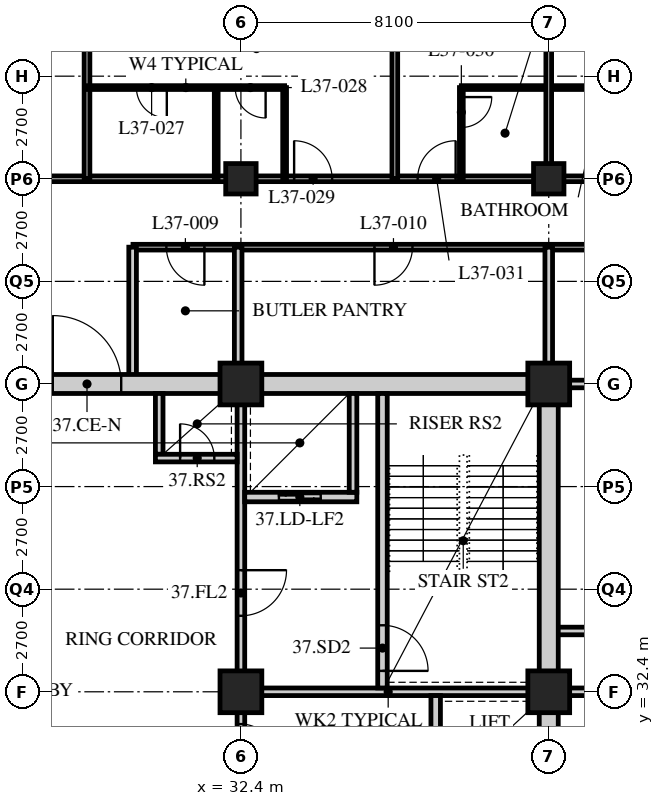
"""IFC4 building model, lengths in metres.
Left out: names, types, materials, properties, quantities, classifications, styles, units other than length and angle.
Written with IfcOpenShell. Run it as: python <this file> out.ifc"""

import sys

from ifc_helpers import new_model, si_unit, direction, frame, frame_2d, origin, origin_2d, place, context, subcontext, project, spatial, rectangle, hollow_rectangle, extrude, element, fill, save


model = new_model("IFC4")
c1 = context("Model", 3, precision=1e-05, world=origin(), true_north=direction((0.0, 1.0)))
c2 = subcontext(c1, "Body", "Model", "MODEL_VIEW")
j1 = project(units=[si_unit("LENGTHUNIT", "METRE"), si_unit("PLANEANGLEUNIT", "RADIAN")], contexts=[c1])
p1 = place(None, origin())
s1 = spatial("IfcSite", under=j1, at=p1, CompositionType="ELEMENT")
p2 = place(p1, origin())
s2 = spatial("IfcBuilding", under=s1, at=p2, CompositionType="ELEMENT")
p3 = place(p2, frame((0.0, 0.0, 144.2)))
s3 = spatial("IfcBuildingStorey", under=s2, at=p3, CompositionType="ELEMENT", Elevation=144.2)
for number, where, z_axis, x_axis in (
    (1, (32.4, 32.4, 0.0), (0.0, 0.0, 1.0), (1.0, 0.0, 0.0)),
    (2, (32.4, 40.5, 0.0), (0.0, 0.0, 1.0), (1.0, 0.0, 0.0)),
):
    element("IfcColumn", number, at=place(p3, frame(where, z_axis=z_axis, x_axis=x_axis)), inside=s3, PredefinedType="COLUMN", context=c2, shape_type="SweptSolid", body=[
        extrude(hollow_rectangle(XDim=1.1, YDim=1.1, WallThickness=0.1, at=origin_2d()), origin(), (0.0, 0.0, 1.0), 3.4),
    ])
p4 = place(p3, frame((32.4, 45.9, 0.0), z_axis=(0.0, 0.0, 1.0), x_axis=(1.0, 0.0, 0.0)))
e3 = element("IfcColumn", 3, at=p4, inside=s3, PredefinedType="COLUMN", context=c2, shape_type="SweptSolid", body=[
    extrude(hollow_rectangle(XDim=0.8, YDim=0.8, WallThickness=0.08, at=origin_2d()), origin(), (0.0, 0.0, 1.0), 3.4),
])
for number, where, z_axis, x_axis in (
    (4, (40.5, 32.4, 0.0), (0.0, 0.0, 1.0), (1.0, 0.0, 0.0)),
    (5, (40.5, 40.5, 0.0), (0.0, 0.0, 1.0), (1.0, 0.0, 0.0)),
):
    element("IfcColumn", number, at=place(p3, frame(where, z_axis=z_axis, x_axis=x_axis)), inside=s3, PredefinedType="COLUMN", context=c2, shape_type="SweptSolid", body=[
        extrude(hollow_rectangle(XDim=1.1, YDim=1.1, WallThickness=0.1, at=origin_2d()), origin(), (0.0, 0.0, 1.0), 3.4),
    ])
p5 = place(p3, frame((40.5, 45.9, 0.0), z_axis=(0.0, 0.0, 1.0), x_axis=(1.0, 0.0, 0.0)))
e6 = element("IfcColumn", 6, at=p5, inside=s3, PredefinedType="COLUMN", context=c2, shape_type="SweptSolid", body=[
    extrude(hollow_rectangle(XDim=0.8, YDim=0.8, WallThickness=0.08, at=origin_2d()), origin(), (0.0, 0.0, 1.0), 3.4),
])
p6 = place(p3, frame((12.15, 45.9, 0.0), z_axis=(0.0, 0.0, 1.0), x_axis=(1.0, 0.0, 0.0)))
e7 = element("IfcWall", 7, at=p6, inside=s3, PredefinedType="PARTITIONING", context=c2, shape_type="SweptSolid", body=[
    extrude(rectangle(XDim=36.45, YDim=0.15, at=frame_2d((18.225, 0.0))), origin(), (0.0, 0.0, 1.0), 2.42),
])
p7 = place(p6, frame((9.225, 0.0, 0.0)))
e8 = element("IfcOpeningElement", 8, at=p7, cuts=e7, PredefinedType="OPENING", context=c2, shape_type="SweptSolid", body=[
    extrude(rectangle(XDim=1.8, YDim=2.4, at=frame_2d((0.9, 1.2))), frame((0.0, 0.085, 0.0), z_axis=(0.0, -1.0, 0.0), x_axis=(1.0, 0.0, 0.0)), (0.0, 0.0, 1.0), 0.17),
])
p8 = place(p6, frame((21.65, 0.0, 0.0)))
e9 = element("IfcOpeningElement", 9, at=p8, cuts=e7, PredefinedType="OPENING", context=c2, shape_type="SweptSolid", body=[
    extrude(rectangle(XDim=1.0, YDim=2.1, at=frame_2d((0.5, 1.05))), frame((0.0, 0.085, 0.0), z_axis=(0.0, -1.0, 0.0), x_axis=(1.0, 0.0, 0.0)), (0.0, 0.0, 1.0), 0.17),
])
p9 = place(p6, frame((24.9, 0.0, 0.0)))
e10 = element("IfcOpeningElement", 10, at=p9, cuts=e7, PredefinedType="OPENING", context=c2, shape_type="SweptSolid", body=[
    extrude(rectangle(XDim=1.0, YDim=2.1, at=frame_2d((0.5, 1.05))), frame((0.0, 0.085, 0.0), z_axis=(0.0, -1.0, 0.0), x_axis=(1.0, 0.0, 0.0)), (0.0, 0.0, 1.0), 0.17),
])
p10 = place(p6, frame((30.8, 0.0, 0.0)))
e11 = element("IfcOpeningElement", 11, at=p10, cuts=e7, PredefinedType="OPENING", context=c2, shape_type="SweptSolid", body=[
    extrude(rectangle(XDim=1.0, YDim=2.1, at=frame_2d((0.5, 1.05))), frame((0.0, 0.085, 0.0), z_axis=(0.0, -1.0, 0.0), x_axis=(1.0, 0.0, 0.0)), (0.0, 0.0, 1.0), 0.17),
])
p11 = place(p6, frame((32.825, 0.0, 0.0)))
e12 = element("IfcOpeningElement", 12, at=p11, cuts=e7, PredefinedType="OPENING", context=c2, shape_type="SweptSolid", body=[
    extrude(rectangle(XDim=1.0, YDim=2.1, at=frame_2d((0.5, 1.05))), frame((0.0, 0.085, 0.0), z_axis=(0.0, -1.0, 0.0), x_axis=(1.0, 0.0, 0.0)), (0.0, 0.0, 1.0), 0.17),
])
p12 = place(p6, frame((1.525, 0.0, 0.0)))
e13 = element("IfcOpeningElement", 13, at=p12, cuts=e7, PredefinedType="OPENING", context=c2, shape_type="SweptSolid", body=[
    extrude(rectangle(XDim=1.0, YDim=2.1, at=frame_2d((0.5, 1.05))), frame((0.0, 0.085, 0.0), z_axis=(0.0, -1.0, 0.0), x_axis=(1.0, 0.0, 0.0)), (0.0, 0.0, 1.0), 0.17),
])
p13 = place(p3, frame((46.8, 44.1, 0.0), z_axis=(0.0, 0.0, 1.0), x_axis=(-1.0, 0.0, 0.0)))
e14 = element("IfcWall", 14, at=p13, inside=s3, PredefinedType="PARTITIONING", context=c2, shape_type="SweptSolid", body=[
    extrude(rectangle(XDim=17.24, YDim=0.15, at=frame_2d((8.62, 0.0))), origin(), (0.0, 0.0, 1.0), 3.19),
])
p14 = place(p13, frame((15.361, 0.0, 0.0)))
e15 = element("IfcOpeningElement", 15, at=p14, cuts=e14, PredefinedType="OPENING", context=c2, shape_type="SweptSolid", body=[
    extrude(rectangle(XDim=1.0, YDim=2.1, at=frame_2d((0.5, 1.05))), frame((0.0, 0.085, 0.0), z_axis=(0.0, -1.0, 0.0), x_axis=(1.0, 0.0, 0.0)), (0.0, 0.0, 1.0), 0.17),
])
p15 = place(p13, frame((9.886, 0.0, 0.0)))
e16 = element("IfcOpeningElement", 16, at=p15, cuts=e14, PredefinedType="OPENING", context=c2, shape_type="SweptSolid", body=[
    extrude(rectangle(XDim=1.0, YDim=2.1, at=frame_2d((0.5, 1.05))), frame((0.0, 0.085, 0.0), z_axis=(0.0, -1.0, 0.0), x_axis=(1.0, 0.0, 0.0)), (0.0, 0.0, 1.0), 0.17),
])
p16 = place(p13, frame((2.65, 0.0, 0.0)))
e17 = element("IfcOpeningElement", 17, at=p16, cuts=e14, PredefinedType="OPENING", context=c2, shape_type="SweptSolid", body=[
    extrude(rectangle(XDim=1.0, YDim=2.1, at=frame_2d((0.5, 1.05))), frame((0.0, 0.085, 0.0), z_axis=(0.0, -1.0, 0.0), x_axis=(1.0, 0.0, 0.0)), (0.0, 0.0, 1.0), 0.17),
])
for number, where, z_axis, x_axis in (
    (18, (40.5, 32.4, 0.0), (0.0, 0.0, 1.0), (1.0, 0.0, 0.0)),
    (19, (46.8, 34.0, 0.0), (0.0, 0.0, 1.0), (-1.0, 0.0, 0.0)),
):
    element("IfcWall", number, at=place(p3, frame(where, z_axis=z_axis, x_axis=x_axis)), inside=s3, PredefinedType="SOLIDWALL", context=c2, shape_type="SweptSolid", body=[
        extrude(rectangle(XDim=6.3, YDim=0.2, at=frame_2d((3.15, 0.0))), origin(), (0.0, 0.0, 1.0), 3.19),
    ])
for number, where, z_axis, x_axis in (
    (20, (40.5, 40.5, 0.0), (0.0, 0.0, 1.0), (0.0, 1.0, 0.0)),
    (21, (32.328, 44.1, 0.0), (0.0, 0.0, 1.0), (0.0, -1.0, 0.0)),
):
    element("IfcWall", number, at=place(p3, frame(where, z_axis=z_axis, x_axis=x_axis)), inside=s3, PredefinedType="SOLIDWALL", context=c2, shape_type="SweptSolid", body=[
        extrude(rectangle(XDim=3.6, YDim=0.2, at=frame_2d((1.8, 0.0))), origin(), (0.0, 0.0, 1.0), 2.42),
    ])
p17 = place(p3, frame((29.55, 40.5, 0.0), z_axis=(0.0, 0.0, 1.0), x_axis=(0.0, 1.0, 0.0)))
e22 = element("IfcWall", 22, at=p17, inside=s3, PredefinedType="SOLIDWALL", context=c2, shape_type="SweptSolid", body=[
    extrude(rectangle(XDim=3.6, YDim=0.2, at=frame_2d((1.8, 0.0))), origin(), (0.0, 0.0, 1.0), 3.19),
])
p18 = place(p3, frame((40.5, 40.5, 0.0), z_axis=(0.0, 0.0, 1.0), x_axis=(1.0, 0.0, 0.0)))
e23 = element("IfcWall", 23, at=p18, inside=s3, PredefinedType="SOLIDWALL", context=c2, shape_type="SweptSolid", body=[
    extrude(rectangle(XDim=6.3, YDim=0.2, at=frame_2d((3.15, 0.0))), origin(), (0.0, 0.0, 1.0), 3.19),
])
p19 = place(p3, frame((28.35, 45.9, 0.0), z_axis=(0.0, 0.0, 1.0), x_axis=(0.0, 1.0, 0.0)))
e24 = element("IfcWall", 24, at=p19, inside=s3, PredefinedType="PARTITIONING", context=c2, shape_type="SweptSolid", body=[
    extrude(rectangle(XDim=7.8, YDim=0.15, at=frame_2d((3.9, 0.0))), origin(), (0.0, 0.0, 1.0), 3.19),
])
p20 = place(p3, frame((28.35, 48.3, 0.0), z_axis=(0.0, 0.0, 1.0), x_axis=(1.0, 0.0, 0.0)))
e25 = element("IfcWall", 25, at=p20, inside=s3, PredefinedType="PARTITIONING", context=c2, shape_type="SweptSolid", body=[
    extrude(rectangle(XDim=5.2, YDim=0.1, at=frame_2d((2.6, 0.0))), origin(), (0.0, 0.0, 1.0), 3.19),
])
p21 = place(p20, frame((1.3, 0.0, 0.0)))
e26 = element("IfcOpeningElement", 26, at=p21, cuts=e25, PredefinedType="OPENING", context=c2, shape_type="SweptSolid", body=[
    extrude(rectangle(XDim=0.8, YDim=2.1, at=frame_2d((0.4, 1.05))), frame((0.0, 0.06, 0.0), z_axis=(0.0, -1.0, 0.0), x_axis=(1.0, 0.0, 0.0)), (0.0, 0.0, 1.0), 0.12),
])
p22 = place(p20, frame((3.9, 0.0, 0.0)))
e27 = element("IfcOpeningElement", 27, at=p22, cuts=e25, PredefinedType="OPENING", context=c2, shape_type="SweptSolid", body=[
    extrude(rectangle(XDim=0.8, YDim=2.1, at=frame_2d((0.4, 1.05))), frame((0.0, 0.06, 0.0), z_axis=(0.0, -1.0, 0.0), x_axis=(1.0, 0.0, 0.0)), (0.0, 0.0, 1.0), 0.12),
])
for number, where, z_axis, x_axis in (
    (28, (31.75, 45.9, 0.0), (0.0, 0.0, 1.0), (0.0, 1.0, 0.0)),
    (29, (33.55, 45.9, 0.0), (0.0, 0.0, 1.0), (0.0, 1.0, 0.0)),
):
    element("IfcWall", number, at=place(p3, frame(where, z_axis=z_axis, x_axis=x_axis)), inside=s3, PredefinedType="PARTITIONING", context=c2, shape_type="SweptSolid", body=[
        extrude(rectangle(XDim=2.4, YDim=0.1, at=frame_2d((1.2, 0.0))), origin(), (0.0, 0.0, 1.0), 3.19),
    ])
p23 = place(p3, frame((36.45, 45.9, 0.0), z_axis=(0.0, 0.0, 1.0), x_axis=(0.0, 1.0, 0.0)))
e30 = element("IfcWall", 30, at=p23, inside=s3, PredefinedType="PARTITIONING", context=c2, shape_type="SweptSolid", body=[
    extrude(rectangle(XDim=7.8, YDim=0.15, at=frame_2d((3.9, 0.0))), origin(), (0.0, 0.0, 1.0), 3.19),
])
p24 = place(p3, frame((38.2, 48.3, 0.0), z_axis=(0.0, 0.0, 1.0), x_axis=(1.0, 0.0, 0.0)))
e31 = element("IfcWall", 31, at=p24, inside=s3, PredefinedType="PARTITIONING", context=c2, shape_type="SweptSolid", body=[
    extrude(rectangle(XDim=4.6, YDim=0.1, at=frame_2d((2.3, 0.0))), origin(), (0.0, 0.0, 1.0), 3.19),
])
p25 = place(p3, frame((38.2, 45.9, 0.0), z_axis=(0.0, 0.0, 1.0), x_axis=(0.0, 1.0, 0.0)))
e32 = element("IfcWall", 32, at=p25, inside=s3, PredefinedType="PARTITIONING", context=c2, shape_type="SweptSolid", body=[
    extrude(rectangle(XDim=2.4, YDim=0.1, at=frame_2d((1.2, 0.0))), origin(), (0.0, 0.0, 1.0), 3.19),
])
p26 = place(p25, frame((1.35, 0.0, 0.0)))
e33 = element("IfcOpeningElement", 33, at=p26, cuts=e32, PredefinedType="OPENING", context=c2, shape_type="SweptSolid", body=[
    extrude(rectangle(XDim=0.8, YDim=2.1, at=frame_2d((0.4, 1.05))), frame((0.0, 0.06, 0.0), z_axis=(0.0, -1.0, 0.0), x_axis=(1.0, 0.0, 0.0)), (0.0, 0.0, 1.0), 0.12),
])
p27 = place(p3, frame((40.5, 45.9, 0.0), z_axis=(0.0, 0.0, 1.0), x_axis=(0.0, 1.0, 0.0)))
e34 = element("IfcWall", 34, at=p27, inside=s3, PredefinedType="PARTITIONING", context=c2, shape_type="SweptSolid", body=[
    extrude(rectangle(XDim=7.8, YDim=0.15, at=frame_2d((3.9, 0.0))), origin(), (0.0, 0.0, 1.0), 2.42),
])
p28 = place(p3, frame((15.95, 40.5, 0.0), z_axis=(0.0, 0.0, 1.0), x_axis=(1.0, 0.0, 0.0)))
e35 = element("IfcWall", 35, at=p28, inside=s3, PredefinedType="SOLIDWALL", context=c2, shape_type="SweptSolid", body=[
    extrude(rectangle(XDim=24.8, YDim=0.5, at=frame_2d((12.4, 0.0))), origin(), (0.0, 0.0, 1.0), 2.42),
])
p29 = place(p28, frame((11.5, 0.0, 0.0)))
e36 = element("IfcOpeningElement", 36, at=p29, cuts=e35, PredefinedType="OPENING", context=c2, shape_type="SweptSolid", body=[
    extrude(rectangle(XDim=1.8, YDim=2.4, at=frame_2d((0.9, 1.2))), frame((0.0, 0.26, 0.0), z_axis=(0.0, -1.0, 0.0), x_axis=(1.0, 0.0, 0.0)), (0.0, 0.0, 1.0), 0.52),
])
p30 = place(p3, frame((40.5, 24.55, 0.0), z_axis=(0.0, 0.0, 1.0), x_axis=(0.0, 1.0, 0.0)))
e37 = element("IfcWall", 37, at=p30, inside=s3, PredefinedType="SOLIDWALL", context=c2, shape_type="SweptSolid", body=[
    extrude(rectangle(XDim=15.7, YDim=0.5, at=frame_2d((7.85, 0.0))), origin(), (0.0, 0.0, 1.0), 2.42),
])
p31 = place(p3, frame((32.3, 32.4, 0.0), z_axis=(0.0, 0.0, 1.0), x_axis=(1.0, 0.0, 0.0)))
e38 = element("IfcWall", 38, at=p31, inside=s3, PredefinedType="SOLIDWALL", context=c2, shape_type="SweptSolid", body=[
    extrude(rectangle(XDim=7.95, YDim=0.2, at=frame_2d((3.975, 0.0))), origin(), (0.0, 0.0, 1.0), 2.578),
])
p32 = place(p3, frame((32.4, 32.5, 0.0), z_axis=(0.0, 0.0, 1.0), x_axis=(0.0, 1.0, 0.0)))
e39 = element("IfcWall", 39, at=p32, inside=s3, PredefinedType="SOLIDWALL", context=c2, shape_type="SweptSolid", body=[
    extrude(rectangle(XDim=7.75, YDim=0.2, at=frame_2d((3.875, 0.0))), origin(), (0.0, 0.0, 1.0), 2.578),
])
p33 = place(p32, frame((1.9, 0.0, 0.0)))
e40 = element("IfcOpeningElement", 40, at=p33, cuts=e39, PredefinedType="OPENING", context=c2, shape_type="SweptSolid", body=[
    extrude(rectangle(XDim=1.2, YDim=2.1, at=frame_2d((0.6, 1.05))), frame((0.0, 0.11, 0.0), z_axis=(0.0, -1.0, 0.0), x_axis=(1.0, 0.0, 0.0)), (0.0, 0.0, 1.0), 0.22),
])
p34 = place(p3, frame((37.525, 24.55, 0.0), z_axis=(0.0, 0.0, 1.0), x_axis=(0.0, 1.0, 0.0)))
e41 = element("IfcWall", 41, at=p34, inside=s3, PredefinedType="SOLIDWALL", context=c2, shape_type="SweptSolid", body=[
    extrude(rectangle(XDim=7.75, YDim=0.25, at=frame_2d((3.875, 0.0))), origin(), (0.0, 0.0, 1.0), 3.19),
])
p35 = place(p3, frame((36.125, 32.5, 0.0), z_axis=(0.0, 0.0, 1.0), x_axis=(0.0, 1.0, 0.0)))
e42 = element("IfcWall", 42, at=p35, inside=s3, PredefinedType="SOLIDWALL", context=c2, shape_type="SweptSolid", body=[
    extrude(rectangle(XDim=7.75, YDim=0.25, at=frame_2d((3.875, 0.0))), origin(), (0.0, 0.0, 1.0), 3.19),
])
p36 = place(p35, frame((0.45, 0.0, 0.0)))
e43 = element("IfcOpeningElement", 43, at=p36, cuts=e42, PredefinedType="OPENING", context=c2, shape_type="SweptSolid", body=[
    extrude(rectangle(XDim=1.2, YDim=2.1, at=frame_2d((0.6, 1.05))), frame((0.0, 0.135, 0.0), z_axis=(0.0, -1.0, 0.0), x_axis=(1.0, 0.0, 0.0)), (0.0, 0.0, 1.0), 0.27),
])
p37 = place(p3, frame((32.5, 37.525, 0.0), z_axis=(0.0, 0.0, 1.0), x_axis=(1.0, 0.0, 0.0)))
e44 = element("IfcWall", 44, at=p37, inside=s3, PredefinedType="SOLIDWALL", context=c2, shape_type="SweptSolid", body=[
    extrude(rectangle(XDim=2.95, YDim=0.25, at=frame_2d((1.475, 0.0))), origin(), (0.0, 0.0, 1.0), 3.19),
])
p38 = place(p37, frame((0.9, 0.0, 0.0)))
e45 = element("IfcOpeningElement", 45, at=p38, cuts=e44, PredefinedType="OPENING", context=c2, shape_type="SweptSolid", body=[
    extrude(rectangle(XDim=1.1, YDim=2.4, at=frame_2d((0.55, 1.2))), frame((0.0, 0.135, 0.0), z_axis=(0.0, -1.0, 0.0), x_axis=(1.0, 0.0, 0.0)), (0.0, 0.0, 1.0), 0.27),
])
p39 = place(p3, frame((35.35, 37.65, 0.0), z_axis=(0.0, 0.0, 1.0), x_axis=(0.0, 1.0, 0.0)))
e46 = element("IfcWall", 46, at=p39, inside=s3, PredefinedType="SOLIDWALL", context=c2, shape_type="SweptSolid", body=[
    extrude(rectangle(XDim=2.6, YDim=0.2, at=frame_2d((1.3, 0.0))), origin(), (0.0, 0.0, 1.0), 3.19),
])
p40 = place(p3, frame((30.25, 38.65, 0.0), z_axis=(0.0, 0.0, 1.0), x_axis=(0.0, 1.0, 0.0)))
e47 = element("IfcWall", 47, at=p40, inside=s3, PredefinedType="SOLIDWALL", context=c2, shape_type="SweptSolid", body=[
    extrude(rectangle(XDim=1.6, YDim=0.2, at=frame_2d((0.8, 0.0))), origin(), (0.0, 0.0, 1.0), 3.19),
])
p41 = place(p3, frame((30.15, 38.55, 0.0), z_axis=(0.0, 0.0, 1.0), x_axis=(1.0, 0.0, 0.0)))
e48 = element("IfcWall", 48, at=p41, inside=s3, PredefinedType="SOLIDWALL", context=c2, shape_type="SweptSolid", body=[
    extrude(rectangle(XDim=2.15, YDim=0.2, at=frame_2d((1.075, 0.0))), origin(), (0.0, 0.0, 1.0), 3.19),
])
p42 = place(p41, frame((0.65, 0.0, 0.0)))
e49 = element("IfcOpeningElement", 49, at=p42, cuts=e48, PredefinedType="OPENING", context=c2, shape_type="SweptSolid", body=[
    extrude(rectangle(XDim=0.9, YDim=2.1, at=frame_2d((0.45, 1.05))), frame((0.0, 0.11, 0.0), z_axis=(0.0, -1.0, 0.0), x_axis=(1.0, 0.0, 0.0)), (0.0, 0.0, 1.0), 0.22),
])
p43 = place(p3, frame((32.4, 24.55, 0.0), z_axis=(0.0, 0.0, 1.0), x_axis=(0.0, 1.0, 0.0)))
e50 = element("IfcWall", 50, at=p43, inside=s3, PredefinedType="PARTITIONING", context=c2, shape_type="SweptSolid", body=[
    extrude(rectangle(XDim=7.75, YDim=0.2, at=frame_2d((3.875, 0.0))), origin(), (0.0, 0.0, 1.0), 2.578),
])
p44 = place(p43, frame((1.0, 0.0, 0.0)))
e51 = element("IfcOpeningElement", 51, at=p44, cuts=e50, PredefinedType="OPENING", context=c2, shape_type="SweptSolid", body=[
    extrude(rectangle(XDim=1.0, YDim=2.1, at=frame_2d((0.5, 1.05))), frame((0.0, 0.11, 0.0), z_axis=(0.0, -1.0, 0.0), x_axis=(1.0, 0.0, 0.0)), (0.0, 0.0, 1.0), 0.22),
])
p45 = place(p43, frame((3.925, 0.0, 0.0)))
e52 = element("IfcOpeningElement", 52, at=p45, cuts=e50, PredefinedType="OPENING", context=c2, shape_type="SweptSolid", body=[
    extrude(rectangle(XDim=1.0, YDim=2.1, at=frame_2d((0.5, 1.05))), frame((0.0, 0.11, 0.0), z_axis=(0.0, -1.0, 0.0), x_axis=(1.0, 0.0, 0.0)), (0.0, 0.0, 1.0), 0.22),
])
p46 = place(p43, frame((6.1, 0.0, 0.0)))
e53 = element("IfcOpeningElement", 53, at=p46, cuts=e50, PredefinedType="OPENING", context=c2, shape_type="SweptSolid", body=[
    extrude(rectangle(XDim=0.9, YDim=2.1, at=frame_2d((0.45, 1.05))), frame((0.0, 0.11, 0.0), z_axis=(0.0, -1.0, 0.0), x_axis=(1.0, 0.0, 0.0)), (0.0, 0.0, 1.0), 0.22),
])
p47 = place(p14, origin())
e54 = element("IfcDoor", 54, at=p47, inside=s3, OperationType="SINGLE_SWING_LEFT", PredefinedType="DOOR", context=c2, shape_type="SweptSolid", body=[
    extrude(rectangle(XDim=1.0, YDim=2.1, at=frame_2d((0.5, 1.05))), frame((0.0, 0.025, 0.0), z_axis=(0.0, -1.0, 0.0), x_axis=(1.0, 0.0, 0.0)), (0.0, 0.0, 1.0), 0.05),
])
fill(e15, e54)
p48 = place(p15, origin())
e55 = element("IfcDoor", 55, at=p48, inside=s3, OperationType="SINGLE_SWING_RIGHT", PredefinedType="DOOR", context=c2, shape_type="SweptSolid", body=[
    extrude(rectangle(XDim=1.0, YDim=2.1, at=frame_2d((0.5, 1.05))), frame((0.0, 0.025, 0.0), z_axis=(0.0, -1.0, 0.0), x_axis=(1.0, 0.0, 0.0)), (0.0, 0.0, 1.0), 0.05),
])
fill(e16, e55)
p49 = place(p21, origin())
e56 = element("IfcDoor", 56, at=p49, inside=s3, OperationType="SINGLE_SWING_LEFT", PredefinedType="DOOR", context=c2, shape_type="SweptSolid", body=[
    extrude(rectangle(XDim=0.8, YDim=2.1, at=frame_2d((0.4, 1.05))), frame((0.0, 0.025, 0.0), z_axis=(0.0, -1.0, 0.0), x_axis=(1.0, 0.0, 0.0)), (0.0, 0.0, 1.0), 0.05),
])
fill(e26, e56)
p50 = place(p22, origin())
e57 = element("IfcDoor", 57, at=p50, inside=s3, OperationType="SINGLE_SWING_LEFT", PredefinedType="DOOR", context=c2, shape_type="SweptSolid", body=[
    extrude(rectangle(XDim=0.8, YDim=2.1, at=frame_2d((0.4, 1.05))), frame((0.0, 0.025, 0.0), z_axis=(0.0, -1.0, 0.0), x_axis=(1.0, 0.0, 0.0)), (0.0, 0.0, 1.0), 0.05),
])
fill(e27, e57)
p51 = place(p8, origin())
e58 = element("IfcDoor", 58, at=p51, inside=s3, OperationType="SINGLE_SWING_LEFT", PredefinedType="DOOR", context=c2, shape_type="SweptSolid", body=[
    extrude(rectangle(XDim=1.0, YDim=2.1, at=frame_2d((0.5, 1.05))), frame((0.0, 0.025, 0.0), z_axis=(0.0, -1.0, 0.0), x_axis=(1.0, 0.0, 0.0)), (0.0, 0.0, 1.0), 0.05),
])
fill(e9, e58)
p52 = place(p26, origin())
e59 = element("IfcDoor", 59, at=p52, inside=s3, OperationType="SINGLE_SWING_LEFT", PredefinedType="DOOR", context=c2, shape_type="SweptSolid", body=[
    extrude(rectangle(XDim=0.8, YDim=2.1, at=frame_2d((0.4, 1.05))), frame((0.0, 0.025, 0.0), z_axis=(0.0, -1.0, 0.0), x_axis=(1.0, 0.0, 0.0)), (0.0, 0.0, 1.0), 0.05),
])
fill(e33, e59)
p53 = place(p9, origin())
e60 = element("IfcDoor", 60, at=p53, inside=s3, OperationType="SINGLE_SWING_RIGHT", PredefinedType="DOOR", context=c2, shape_type="SweptSolid", body=[
    extrude(rectangle(XDim=1.0, YDim=2.1, at=frame_2d((0.5, 1.05))), frame((0.0, 0.025, 0.0), z_axis=(0.0, -1.0, 0.0), x_axis=(1.0, 0.0, 0.0)), (0.0, 0.0, 1.0), 0.05),
])
fill(e10, e60)
p54 = place(p46, origin())
e61 = element("IfcDoor", 61, at=p54, inside=s3, OperationType="SINGLE_SWING_RIGHT", PredefinedType="DOOR", context=c2, shape_type="SweptSolid", body=[
    extrude(rectangle(XDim=0.9, YDim=2.1, at=frame_2d((0.45, 1.05))), frame((0.0, 0.025, 0.0), z_axis=(0.0, -1.0, 0.0), x_axis=(1.0, 0.0, 0.0)), (0.0, 0.0, 1.0), 0.05),
])
fill(e53, e61)
p55 = place(p36, origin())
e62 = element("IfcDoor", 62, at=p55, inside=s3, OperationType="SINGLE_SWING_RIGHT", PredefinedType="DOOR", context=c2, shape_type="SweptSolid", body=[
    extrude(rectangle(XDim=1.2, YDim=2.1, at=frame_2d((0.6, 1.05))), frame((0.0, 0.025, 0.0), z_axis=(0.0, -1.0, 0.0), x_axis=(1.0, 0.0, 0.0)), (0.0, 0.0, 1.0), 0.05),
])
fill(e43, e62)
p56 = place(p33, origin())
e63 = element("IfcDoor", 63, at=p56, inside=s3, OperationType="SINGLE_SWING_LEFT", PredefinedType="DOOR", context=c2, shape_type="SweptSolid", body=[
    extrude(rectangle(XDim=1.2, YDim=2.1, at=frame_2d((0.6, 1.05))), frame((0.0, 0.025, 0.0), z_axis=(0.0, -1.0, 0.0), x_axis=(1.0, 0.0, 0.0)), (0.0, 0.0, 1.0), 0.05),
])
fill(e40, e63)
p57 = place(p42, origin())
e64 = element("IfcDoor", 64, at=p57, inside=s3, OperationType="SINGLE_SWING_LEFT", PredefinedType="DOOR", context=c2, shape_type="SweptSolid", body=[
    extrude(rectangle(XDim=0.9, YDim=2.1, at=frame_2d((0.45, 1.05))), frame((0.0, 0.025, 0.0), z_axis=(0.0, -1.0, 0.0), x_axis=(1.0, 0.0, 0.0)), (0.0, 0.0, 1.0), 0.05),
])
fill(e49, e64)
p58 = place(p38, origin())
e65 = element("IfcDoor", 65, at=p58, inside=s3, OperationType="DOUBLE_DOOR_SLIDING", PredefinedType="DOOR", context=c2, shape_type="SweptSolid", body=[
    extrude(rectangle(XDim=1.1, YDim=2.4, at=frame_2d((0.55, 1.2))), frame((0.0, 0.025, 0.0), z_axis=(0.0, -1.0, 0.0), x_axis=(1.0, 0.0, 0.0)), (0.0, 0.0, 1.0), 0.05),
])
fill(e45, e65)
p59 = place(p29, origin())
e66 = element("IfcDoor", 66, at=p59, inside=s3, OperationType="DOUBLE_DOOR_SINGLE_SWING", PredefinedType="DOOR", context=c2, shape_type="SweptSolid", body=[
    extrude(rectangle(XDim=1.8, YDim=2.4, at=frame_2d((0.9, 1.2))), frame((0.0, 0.025, 0.0), z_axis=(0.0, -1.0, 0.0), x_axis=(1.0, 0.0, 0.0)), (0.0, 0.0, 1.0), 0.05),
])
fill(e36, e66)
save(model, sys.argv[1])
